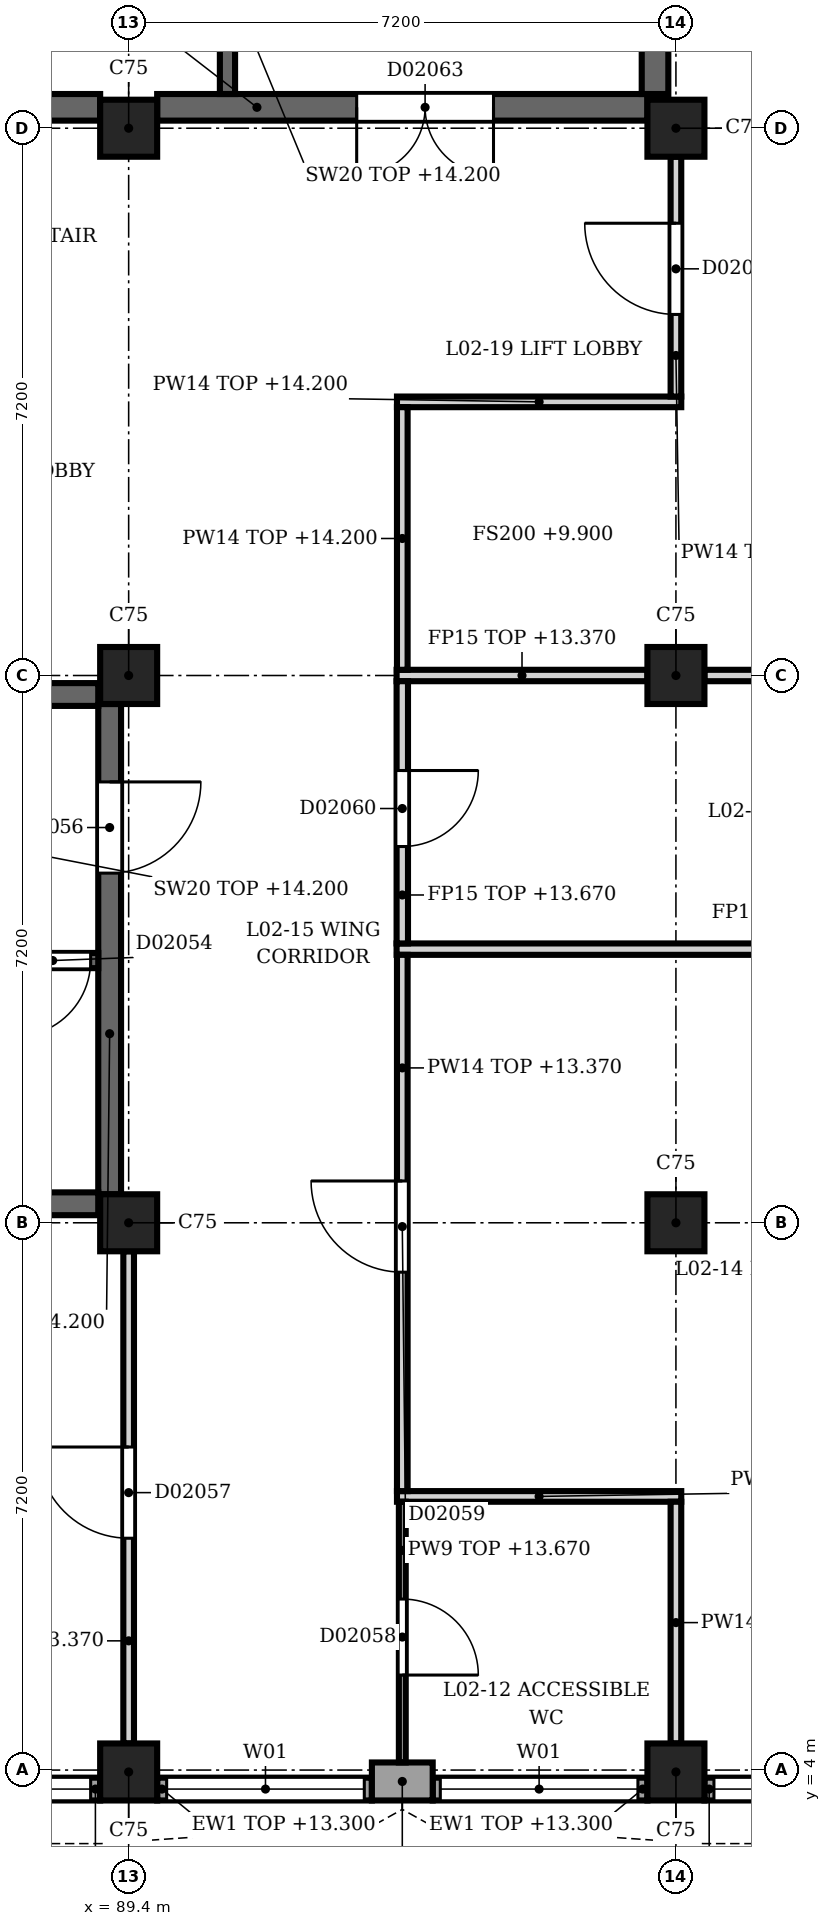
"""IFC4 building model, lengths in metres.
Left out: names, types, materials, properties, quantities, classifications, styles, units other than length and angle.
Written with IfcOpenShell. Run it as: python <this file> out.ifc"""

import sys

from ifc_helpers import new_model, si_unit, direction, frame, frame_2d, origin, origin_2d, place, context, subcontext, project, spatial, rectangle, extrude, element, fill, save


model = new_model("IFC4")
c1 = context("Model", 3, precision=1e-05, world=origin(), true_north=direction((0.0, 1.0)))
c2 = subcontext(c1, "Body", "Model", "MODEL_VIEW")
j1 = project(units=[si_unit("LENGTHUNIT", "METRE"), si_unit("PLANEANGLEUNIT", "RADIAN")], contexts=[c1])
p1 = place(None, origin())
s1 = spatial("IfcSite", under=j1, at=p1, CompositionType="ELEMENT")
p2 = place(p1, origin())
s2 = spatial("IfcBuilding", under=s1, at=p2, CompositionType="ELEMENT")
p3 = place(p2, frame((0.0, 0.0, 9.9)))
s3 = spatial("IfcBuildingStorey", under=s2, at=p3, CompositionType="ELEMENT", Elevation=9.9)
for number, where, z_axis, x_axis in (
    (1, (89.4, 3.975, 0.0), (0.0, 0.0, 1.0), (1.0, 0.0, 0.0)),
    (2, (89.4, 11.2, 0.0), (0.0, 0.0, 1.0), (1.0, 0.0, 0.0)),
    (3, (89.4, 18.4, 0.0), (0.0, 0.0, 1.0), (1.0, 0.0, 0.0)),
    (4, (89.4, 25.6, 0.0), (0.0, 0.0, 1.0), (1.0, 0.0, 0.0)),
    (5, (96.6, 3.975, 0.0), (0.0, 0.0, 1.0), (1.0, 0.0, 0.0)),
    (6, (96.6, 11.2, 0.0), (0.0, 0.0, 1.0), (1.0, 0.0, 0.0)),
    (7, (96.6, 18.4, 0.0), (0.0, 0.0, 1.0), (1.0, 0.0, 0.0)),
    (8, (96.6, 25.6, 0.0), (0.0, 0.0, 1.0), (1.0, 0.0, 0.0)),
):
    element("IfcColumn", number, at=place(p3, frame(where, z_axis=z_axis, x_axis=x_axis)), inside=s3, PredefinedType="COLUMN", context=c2, shape_type="SweptSolid", body=[
        extrude(rectangle(XDim=0.75, YDim=0.75, at=origin_2d()), origin(), (0.0, 0.0, 1.0), 4.5),
    ])
p4 = place(p3, frame((93.4, 3.85, 0.0), z_axis=(0.0, 0.0, 1.0), x_axis=(-1.0, 0.0, 0.0)))
e9 = element("IfcWall", 9, at=p4, inside=s3, PredefinedType="SOLIDWALL", context=c2, shape_type="SweptSolid", body=[
    extrude(rectangle(XDim=0.8, YDim=0.5, at=frame_2d((0.4, 0.0))), origin(), (0.0, 0.0, 1.0), 3.4),
])
p5 = place(p3, frame((99.8, 3.75, 0.0), z_axis=(0.0, 0.0, 1.0), x_axis=(-1.0, 0.0, 0.0)))
e10 = element("IfcWall", 10, at=p5, inside=s3, PredefinedType="SOLIDWALL", context=c2, shape_type="SweptSolid", body=[
    extrude(rectangle(XDim=2.825, YDim=0.3, at=frame_2d((1.413, 0.0))), origin(), (0.0, 0.0, 1.0), 3.4),
])
p6 = place(p5, frame((0.1, 0.0, 0.9)))
e11 = element("IfcOpeningElement", 11, at=p6, cuts=e10, PredefinedType="OPENING", context=c2, shape_type="SweptSolid", body=[
    extrude(rectangle(XDim=2.6, YDim=2.4, at=frame_2d((1.3, 1.2))), frame((0.0, 0.16, 0.0), z_axis=(0.0, -1.0, 0.0), x_axis=(1.0, 0.0, 0.0)), (0.0, 0.0, 1.0), 0.32),
])
p7 = place(p3, frame((96.225, 3.75, 0.0), z_axis=(0.0, 0.0, 1.0), x_axis=(-1.0, 0.0, 0.0)))
e12 = element("IfcWall", 12, at=p7, inside=s3, PredefinedType="SOLIDWALL", context=c2, shape_type="SweptSolid", body=[
    extrude(rectangle(XDim=2.825, YDim=0.3, at=frame_2d((1.413, 0.0))), origin(), (0.0, 0.0, 1.0), 3.4),
])
p8 = place(p7, frame((0.125, 0.0, 0.9)))
e13 = element("IfcOpeningElement", 13, at=p8, cuts=e12, PredefinedType="OPENING", context=c2, shape_type="SweptSolid", body=[
    extrude(rectangle(XDim=2.6, YDim=2.4, at=frame_2d((1.3, 1.2))), frame((0.0, 0.16, 0.0), z_axis=(0.0, -1.0, 0.0), x_axis=(1.0, 0.0, 0.0)), (0.0, 0.0, 1.0), 0.32),
])
p9 = place(p3, frame((92.6, 3.75, 0.0), z_axis=(0.0, 0.0, 1.0), x_axis=(-1.0, 0.0, 0.0)))
e14 = element("IfcWall", 14, at=p9, inside=s3, PredefinedType="SOLIDWALL", context=c2, shape_type="SweptSolid", body=[
    extrude(rectangle(XDim=2.825, YDim=0.3, at=frame_2d((1.413, 0.0))), origin(), (0.0, 0.0, 1.0), 3.4),
])
p10 = place(p9, frame((0.1, 0.0, 0.9)))
e15 = element("IfcOpeningElement", 15, at=p10, cuts=e14, PredefinedType="OPENING", context=c2, shape_type="SweptSolid", body=[
    extrude(rectangle(XDim=2.6, YDim=2.4, at=frame_2d((1.3, 1.2))), frame((0.0, 0.16, 0.0), z_axis=(0.0, -1.0, 0.0), x_axis=(1.0, 0.0, 0.0)), (0.0, 0.0, 1.0), 0.32),
])
p11 = place(p3, frame((89.025, 3.75, 0.0), z_axis=(0.0, 0.0, 1.0), x_axis=(-1.0, 0.0, 0.0)))
e16 = element("IfcWall", 16, at=p11, inside=s3, PredefinedType="SOLIDWALL", context=c2, shape_type="SweptSolid", body=[
    extrude(rectangle(XDim=2.825, YDim=0.3, at=frame_2d((1.413, 0.0))), origin(), (0.0, 0.0, 1.0), 3.4),
])
p12 = place(p11, frame((0.125, 0.0, 0.9)))
e17 = element("IfcOpeningElement", 17, at=p12, cuts=e16, PredefinedType="OPENING", context=c2, shape_type="SweptSolid", body=[
    extrude(rectangle(XDim=2.6, YDim=2.4, at=frame_2d((1.3, 1.2))), frame((0.0, 0.16, 0.0), z_axis=(0.0, -1.0, 0.0), x_axis=(1.0, 0.0, 0.0)), (0.0, 0.0, 1.0), 0.32),
])
p13 = place(p3, frame((82.575, 25.875, 0.0), z_axis=(0.0, 0.0, 1.0), x_axis=(1.0, 0.0, 0.0)))
e18 = element("IfcWall", 18, at=p13, inside=s3, PredefinedType="SHEAR", context=c2, shape_type="SweptSolid", body=[
    extrude(rectangle(XDim=6.45, YDim=0.35, at=frame_2d((3.225, 0.0))), origin(), (0.0, 0.0, 1.0), 4.3),
])
p14 = place(p13, frame((3.825, 0.0, 0.0)))
e19 = element("IfcOpeningElement", 19, at=p14, cuts=e18, PredefinedType="OPENING", context=c2, shape_type="SweptSolid", body=[
    extrude(rectangle(XDim=1.2, YDim=2.1, at=frame_2d((0.6, 1.05))), frame((0.0, 0.185, 0.0), z_axis=(0.0, -1.0, 0.0), x_axis=(1.0, 0.0, 0.0)), (0.0, 0.0, 1.0), 0.37),
])
p15 = place(p3, frame((89.775, 25.875, 0.0), z_axis=(0.0, 0.0, 1.0), x_axis=(1.0, 0.0, 0.0)))
e20 = element("IfcWall", 20, at=p15, inside=s3, PredefinedType="SHEAR", context=c2, shape_type="SweptSolid", body=[
    extrude(rectangle(XDim=6.45, YDim=0.35, at=frame_2d((3.225, 0.0))), origin(), (0.0, 0.0, 1.0), 4.3),
])
p16 = place(p15, frame((2.625, 0.0, 0.0)))
e21 = element("IfcOpeningElement", 21, at=p16, cuts=e20, PredefinedType="OPENING", context=c2, shape_type="SweptSolid", body=[
    extrude(rectangle(XDim=1.8, YDim=2.1, at=frame_2d((0.9, 1.05))), frame((0.0, 0.185, 0.0), z_axis=(0.0, -1.0, 0.0), x_axis=(1.0, 0.0, 0.0)), (0.0, 0.0, 1.0), 0.37),
])
p17 = place(p3, frame((96.325, 26.05, 0.0), z_axis=(0.0, 0.0, 1.0), x_axis=(0.0, 1.0, 0.0)))
e22 = element("IfcWall", 22, at=p17, inside=s3, PredefinedType="SHEAR", context=c2, shape_type="SweptSolid", body=[
    extrude(rectangle(XDim=6.3, YDim=0.35, at=frame_2d((3.15, 0.0))), origin(), (0.0, 0.0, 1.0), 4.3),
])
p18 = place(p3, frame((90.7, 26.05, 0.0), z_axis=(0.0, 0.0, 1.0), x_axis=(0.0, 1.0, 0.0)))
e23 = element("IfcWall", 23, at=p18, inside=s3, PredefinedType="SHEAR", context=c2, shape_type="SweptSolid", body=[
    extrude(rectangle(XDim=3.05, YDim=0.2, at=frame_2d((1.525, 0.0))), origin(), (0.0, 0.0, 1.0), 4.3),
])
p19 = place(p3, frame((89.15, 11.575, 0.0), z_axis=(0.0, 0.0, 1.0), x_axis=(0.0, 1.0, 0.0)))
e24 = element("IfcWall", 24, at=p19, inside=s3, PredefinedType="SHEAR", context=c2, shape_type="SweptSolid", body=[
    extrude(rectangle(XDim=6.45, YDim=0.3, at=frame_2d((3.225, 0.0))), origin(), (0.0, 0.0, 1.0), 4.3),
])
p20 = place(p19, frame((4.225, 0.0, 0.0)))
e25 = element("IfcOpeningElement", 25, at=p20, cuts=e24, PredefinedType="OPENING", context=c2, shape_type="SweptSolid", body=[
    extrude(rectangle(XDim=1.2, YDim=2.1, at=frame_2d((0.6, 1.05))), frame((0.0, 0.16, 0.0), z_axis=(0.0, -1.0, 0.0), x_axis=(1.0, 0.0, 0.0)), (0.0, 0.0, 1.0), 0.32),
])
for number, where, z_axis, x_axis in (
    (26, (82.6, 11.45, 0.0), (0.0, 0.0, 1.0), (1.0, 0.0, 0.0)),
    (27, (82.6, 18.15, 0.0), (0.0, 0.0, 1.0), (1.0, 0.0, 0.0)),
):
    element("IfcWall", number, at=place(p3, frame(where, z_axis=z_axis, x_axis=x_axis)), inside=s3, PredefinedType="SHEAR", context=c2, shape_type="SweptSolid", body=[
        extrude(rectangle(XDim=6.4, YDim=0.3, at=frame_2d((3.2, 0.0))), origin(), (0.0, 0.0, 1.0), 4.3),
    ])
p21 = place(p3, frame((89.0, 14.65, 0.0), z_axis=(0.0, 0.0, 1.0), x_axis=(-1.0, 0.0, 0.0)))
e28 = element("IfcWall", 28, at=p21, inside=s3, PredefinedType="SHEAR", context=c2, shape_type="SweptSolid", body=[
    extrude(rectangle(XDim=6.4, YDim=0.2, at=frame_2d((3.2, 0.0))), origin(), (0.0, 0.0, 1.0), 4.3),
])
p22 = place(p21, frame((0.1, 0.0, 0.0)))
e29 = element("IfcOpeningElement", 29, at=p22, cuts=e28, PredefinedType="OPENING", context=c2, shape_type="SweptSolid", body=[
    extrude(rectangle(XDim=1.0, YDim=2.1, at=frame_2d((0.5, 1.05))), frame((0.0, 0.11, 0.0), z_axis=(0.0, -1.0, 0.0), x_axis=(1.0, 0.0, 0.0)), (0.0, 0.0, 1.0), 0.22),
])
p23 = place(p3, frame((92.93, 7.6, 0.0), z_axis=(0.0, 0.0, 1.0), x_axis=(1.0, 0.0, 0.0)))
e30 = element("IfcWall", 30, at=p23, inside=s3, PredefinedType="PARTITIONING", context=c2, shape_type="SweptSolid", body=[
    extrude(rectangle(XDim=3.74, YDim=0.14, at=frame_2d((1.87, 0.0))), origin(), (0.0, 0.0, 1.0), 4.3),
])
p24 = place(p3, frame((92.925, 14.8, 0.0), z_axis=(0.0, 0.0, 1.0), x_axis=(1.0, 0.0, 0.0)))
e31 = element("IfcWall", 31, at=p24, inside=s3, PredefinedType="PARTITIONING", context=c2, shape_type="SweptSolid", body=[
    extrude(rectangle(XDim=10.775, YDim=0.15, at=frame_2d((5.387, 0.0))), origin(), (0.0, 0.0, 1.0), 3.47),
])
p25 = place(p3, frame((92.925, 18.4, 0.0), z_axis=(0.0, 0.0, 1.0), x_axis=(1.0, 0.0, 0.0)))
e32 = element("IfcWall", 32, at=p25, inside=s3, PredefinedType="PARTITIONING", context=c2, shape_type="SweptSolid", body=[
    extrude(rectangle(XDim=3.3, YDim=0.15, at=frame_2d((1.65, 0.0))), origin(), (0.0, 0.0, 1.0), 3.47),
])
p26 = place(p3, frame((96.975, 18.4, 0.0), z_axis=(0.0, 0.0, 1.0), x_axis=(1.0, 0.0, 0.0)))
e33 = element("IfcWall", 33, at=p26, inside=s3, PredefinedType="PARTITIONING", context=c2, shape_type="SweptSolid", body=[
    extrude(rectangle(XDim=6.475, YDim=0.15, at=frame_2d((3.237, 0.0))), origin(), (0.0, 0.0, 1.0), 3.47),
])
p27 = place(p3, frame((92.93, 22.0, 0.0), z_axis=(0.0, 0.0, 1.0), x_axis=(1.0, 0.0, 0.0)))
e34 = element("IfcWall", 34, at=p27, inside=s3, PredefinedType="PARTITIONING", context=c2, shape_type="SweptSolid", body=[
    extrude(rectangle(XDim=3.74, YDim=0.14, at=frame_2d((1.87, 0.0))), origin(), (0.0, 0.0, 1.0), 4.3),
])
p28 = place(p3, frame((89.4, 4.35, 0.0), z_axis=(0.0, 0.0, 1.0), x_axis=(0.0, 1.0, 0.0)))
e35 = element("IfcWall", 35, at=p28, inside=s3, PredefinedType="PARTITIONING", context=c2, shape_type="SweptSolid", body=[
    extrude(rectangle(XDim=6.475, YDim=0.14, at=frame_2d((3.237, 0.0))), origin(), (0.0, 0.0, 1.0), 3.47),
])
p29 = place(p28, frame((2.7, 0.0, 0.0)))
e36 = element("IfcOpeningElement", 36, at=p29, cuts=e35, PredefinedType="OPENING", context=c2, shape_type="SweptSolid", body=[
    extrude(rectangle(XDim=1.2, YDim=2.2, at=frame_2d((0.6, 1.1))), frame((0.0, 0.08, 0.0), z_axis=(0.0, -1.0, 0.0), x_axis=(1.0, 0.0, 0.0)), (0.0, 0.0, 1.0), 0.16),
])
p30 = place(p3, frame((93.0, 7.53, 0.0), z_axis=(0.0, 0.0, 1.0), x_axis=(0.0, -1.0, 0.0)))
e37 = element("IfcWall", 37, at=p30, inside=s3, PredefinedType="PARTITIONING", context=c2, shape_type="SweptSolid", body=[
    extrude(rectangle(XDim=3.43, YDim=0.09, at=frame_2d((1.715, 0.0))), origin(), (0.0, 0.0, 1.0), 3.77),
])
p31 = place(p30, frame((1.28, 0.0, 0.0)))
e38 = element("IfcOpeningElement", 38, at=p31, cuts=e37, PredefinedType="OPENING", context=c2, shape_type="SweptSolid", body=[
    extrude(rectangle(XDim=1.0, YDim=2.2, at=frame_2d((0.5, 1.1))), frame((0.0, 0.055, 0.0), z_axis=(0.0, -1.0, 0.0), x_axis=(1.0, 0.0, 0.0)), (0.0, 0.0, 1.0), 0.11),
])
p32 = place(p3, frame((93.0, 14.725, 0.0), z_axis=(0.0, 0.0, 1.0), x_axis=(0.0, -1.0, 0.0)))
e39 = element("IfcWall", 39, at=p32, inside=s3, PredefinedType="PARTITIONING", context=c2, shape_type="SweptSolid", body=[
    extrude(rectangle(XDim=7.055, YDim=0.14, at=frame_2d((3.528, 0.0))), origin(), (0.0, 0.0, 1.0), 3.47),
])
p33 = place(p32, frame((2.975, 0.0, 0.0)))
e40 = element("IfcOpeningElement", 40, at=p33, cuts=e39, PredefinedType="OPENING", context=c2, shape_type="SweptSolid", body=[
    extrude(rectangle(XDim=1.2, YDim=2.1, at=frame_2d((0.6, 1.05))), frame((0.0, 0.08, 0.0), z_axis=(0.0, -1.0, 0.0), x_axis=(1.0, 0.0, 0.0)), (0.0, 0.0, 1.0), 0.16),
])
p34 = place(p3, frame((93.0, 18.325, 0.0), z_axis=(0.0, 0.0, 1.0), x_axis=(0.0, -1.0, 0.0)))
e41 = element("IfcWall", 41, at=p34, inside=s3, PredefinedType="PARTITIONING", context=c2, shape_type="SweptSolid", body=[
    extrude(rectangle(XDim=3.45, YDim=0.15, at=frame_2d((1.725, 0.0))), origin(), (0.0, 0.0, 1.0), 3.77),
])
p35 = place(p34, frame((1.175, 0.0, 0.0)))
e42 = element("IfcOpeningElement", 42, at=p35, cuts=e41, PredefinedType="OPENING", context=c2, shape_type="SweptSolid", body=[
    extrude(rectangle(XDim=1.0, YDim=2.3, at=frame_2d((0.5, 1.15))), frame((0.0, 0.085, 0.0), z_axis=(0.0, -1.0, 0.0), x_axis=(1.0, 0.0, 0.0)), (0.0, 0.0, 1.0), 0.17),
])
p36 = place(p3, frame((93.0, 18.475, 0.0), z_axis=(0.0, 0.0, 1.0), x_axis=(0.0, 1.0, 0.0)))
e43 = element("IfcWall", 43, at=p36, inside=s3, PredefinedType="PARTITIONING", context=c2, shape_type="SweptSolid", body=[
    extrude(rectangle(XDim=3.455, YDim=0.14, at=frame_2d((1.728, 0.0))), origin(), (0.0, 0.0, 1.0), 4.3),
])
p37 = place(p3, frame((96.6, 4.35, 0.0), z_axis=(0.0, 0.0, 1.0), x_axis=(0.0, 1.0, 0.0)))
e44 = element("IfcWall", 44, at=p37, inside=s3, PredefinedType="PARTITIONING", context=c2, shape_type="SweptSolid", body=[
    extrude(rectangle(XDim=3.18, YDim=0.14, at=frame_2d((1.59, 0.0))), origin(), (0.0, 0.0, 1.0), 3.47),
])
p38 = place(p3, frame((96.6, 25.225, 0.0), z_axis=(0.0, 0.0, 1.0), x_axis=(0.0, -1.0, 0.0)))
e45 = element("IfcWall", 45, at=p38, inside=s3, PredefinedType="PARTITIONING", context=c2, shape_type="SweptSolid", body=[
    extrude(rectangle(XDim=3.155, YDim=0.14, at=frame_2d((1.578, 0.0))), origin(), (0.0, 0.0, 1.0), 3.47),
])
p39 = place(p38, frame((0.875, 0.0, 0.0)))
e46 = element("IfcOpeningElement", 46, at=p39, cuts=e45, PredefinedType="OPENING", context=c2, shape_type="SweptSolid", body=[
    extrude(rectangle(XDim=1.2, YDim=2.1, at=frame_2d((0.6, 1.05))), frame((0.0, 0.08, 0.0), z_axis=(0.0, -1.0, 0.0), x_axis=(1.0, 0.0, 0.0)), (0.0, 0.0, 1.0), 0.16),
])
p40 = place(p6, origin())
e47 = element("IfcWindow", 47, at=p40, inside=s3, PartitioningType="SINGLE_PANEL", PredefinedType="WINDOW", context=c2, shape_type="SweptSolid", body=[
    extrude(rectangle(XDim=2.6, YDim=2.4, at=frame_2d((1.3, 1.2))), frame((0.0, 0.03, 0.0), z_axis=(0.0, -1.0, 0.0), x_axis=(1.0, 0.0, 0.0)), (0.0, 0.0, 1.0), 0.06),
])
fill(e11, e47)
p41 = place(p8, origin())
e48 = element("IfcWindow", 48, at=p41, inside=s3, PartitioningType="SINGLE_PANEL", PredefinedType="WINDOW", context=c2, shape_type="SweptSolid", body=[
    extrude(rectangle(XDim=2.6, YDim=2.4, at=frame_2d((1.3, 1.2))), frame((0.0, 0.03, 0.0), z_axis=(0.0, -1.0, 0.0), x_axis=(1.0, 0.0, 0.0)), (0.0, 0.0, 1.0), 0.06),
])
fill(e13, e48)
p42 = place(p10, origin())
e49 = element("IfcWindow", 49, at=p42, inside=s3, PartitioningType="SINGLE_PANEL", PredefinedType="WINDOW", context=c2, shape_type="SweptSolid", body=[
    extrude(rectangle(XDim=2.6, YDim=2.4, at=frame_2d((1.3, 1.2))), frame((0.0, 0.03, 0.0), z_axis=(0.0, -1.0, 0.0), x_axis=(1.0, 0.0, 0.0)), (0.0, 0.0, 1.0), 0.06),
])
fill(e15, e49)
p43 = place(p12, origin())
e50 = element("IfcWindow", 50, at=p43, inside=s3, PartitioningType="SINGLE_PANEL", PredefinedType="WINDOW", context=c2, shape_type="SweptSolid", body=[
    extrude(rectangle(XDim=2.6, YDim=2.4, at=frame_2d((1.3, 1.2))), frame((0.0, 0.03, 0.0), z_axis=(0.0, -1.0, 0.0), x_axis=(1.0, 0.0, 0.0)), (0.0, 0.0, 1.0), 0.06),
])
fill(e17, e50)
p44 = place(p16, origin())
e51 = element("IfcDoor", 51, at=p44, inside=s3, OperationType="SINGLE_SWING_LEFT", PredefinedType="DOOR", context=c2, shape_type="SweptSolid", body=[
    extrude(rectangle(XDim=1.8, YDim=2.1, at=frame_2d((0.9, 1.05))), frame((0.0, 0.025, 0.0), z_axis=(0.0, -1.0, 0.0), x_axis=(1.0, 0.0, 0.0)), (0.0, 0.0, 1.0), 0.05),
])
fill(e21, e51)
p45 = place(p20, origin())
e52 = element("IfcDoor", 52, at=p45, inside=s3, OperationType="SINGLE_SWING_RIGHT", PredefinedType="DOOR", context=c2, shape_type="SweptSolid", body=[
    extrude(rectangle(XDim=1.2, YDim=2.1, at=frame_2d((0.6, 1.05))), frame((0.0, 0.025, 0.0), z_axis=(0.0, -1.0, 0.0), x_axis=(1.0, 0.0, 0.0)), (0.0, 0.0, 1.0), 0.05),
])
fill(e25, e52)
p46 = place(p22, origin())
e53 = element("IfcDoor", 53, at=p46, inside=s3, OperationType="SINGLE_SWING_LEFT", PredefinedType="DOOR", context=c2, shape_type="SweptSolid", body=[
    extrude(rectangle(XDim=1.0, YDim=2.1, at=frame_2d((0.5, 1.05))), frame((0.0, 0.025, 0.0), z_axis=(0.0, -1.0, 0.0), x_axis=(1.0, 0.0, 0.0)), (0.0, 0.0, 1.0), 0.05),
])
fill(e29, e53)
p47 = place(p29, origin())
e54 = element("IfcDoor", 54, at=p47, inside=s3, OperationType="SINGLE_SWING_RIGHT", PredefinedType="DOOR", context=c2, shape_type="SweptSolid", body=[
    extrude(rectangle(XDim=1.2, YDim=2.2, at=frame_2d((0.6, 1.1))), frame((0.0, 0.025, 0.0), z_axis=(0.0, -1.0, 0.0), x_axis=(1.0, 0.0, 0.0)), (0.0, 0.0, 1.0), 0.05),
])
fill(e36, e54)
p48 = place(p31, origin())
e55 = element("IfcDoor", 55, at=p48, inside=s3, OperationType="SINGLE_SWING_RIGHT", PredefinedType="DOOR", context=c2, shape_type="SweptSolid", body=[
    extrude(rectangle(XDim=1.0, YDim=2.2, at=frame_2d((0.5, 1.1))), frame((0.0, 0.025, 0.0), z_axis=(0.0, -1.0, 0.0), x_axis=(1.0, 0.0, 0.0)), (0.0, 0.0, 1.0), 0.05),
])
fill(e38, e55)
p49 = place(p33, origin())
e56 = element("IfcDoor", 56, at=p49, inside=s3, OperationType="SINGLE_SWING_RIGHT", PredefinedType="DOOR", context=c2, shape_type="SweptSolid", body=[
    extrude(rectangle(XDim=1.2, YDim=2.1, at=frame_2d((0.6, 1.05))), frame((0.0, 0.025, 0.0), z_axis=(0.0, -1.0, 0.0), x_axis=(1.0, 0.0, 0.0)), (0.0, 0.0, 1.0), 0.05),
])
fill(e40, e56)
p50 = place(p35, origin())
e57 = element("IfcDoor", 57, at=p50, inside=s3, OperationType="SINGLE_SWING_LEFT", PredefinedType="DOOR", context=c2, shape_type="SweptSolid", body=[
    extrude(rectangle(XDim=1.0, YDim=2.3, at=frame_2d((0.5, 1.15))), frame((0.0, 0.025, 0.0), z_axis=(0.0, -1.0, 0.0), x_axis=(1.0, 0.0, 0.0)), (0.0, 0.0, 1.0), 0.05),
])
fill(e42, e57)
p51 = place(p39, origin())
e58 = element("IfcDoor", 58, at=p51, inside=s3, OperationType="SINGLE_SWING_LEFT", PredefinedType="DOOR", context=c2, shape_type="SweptSolid", body=[
    extrude(rectangle(XDim=1.2, YDim=2.1, at=frame_2d((0.6, 1.05))), frame((0.0, 0.025, 0.0), z_axis=(0.0, -1.0, 0.0), x_axis=(1.0, 0.0, 0.0)), (0.0, 0.0, 1.0), 0.05),
])
fill(e46, e58)
save(model, sys.argv[1])
